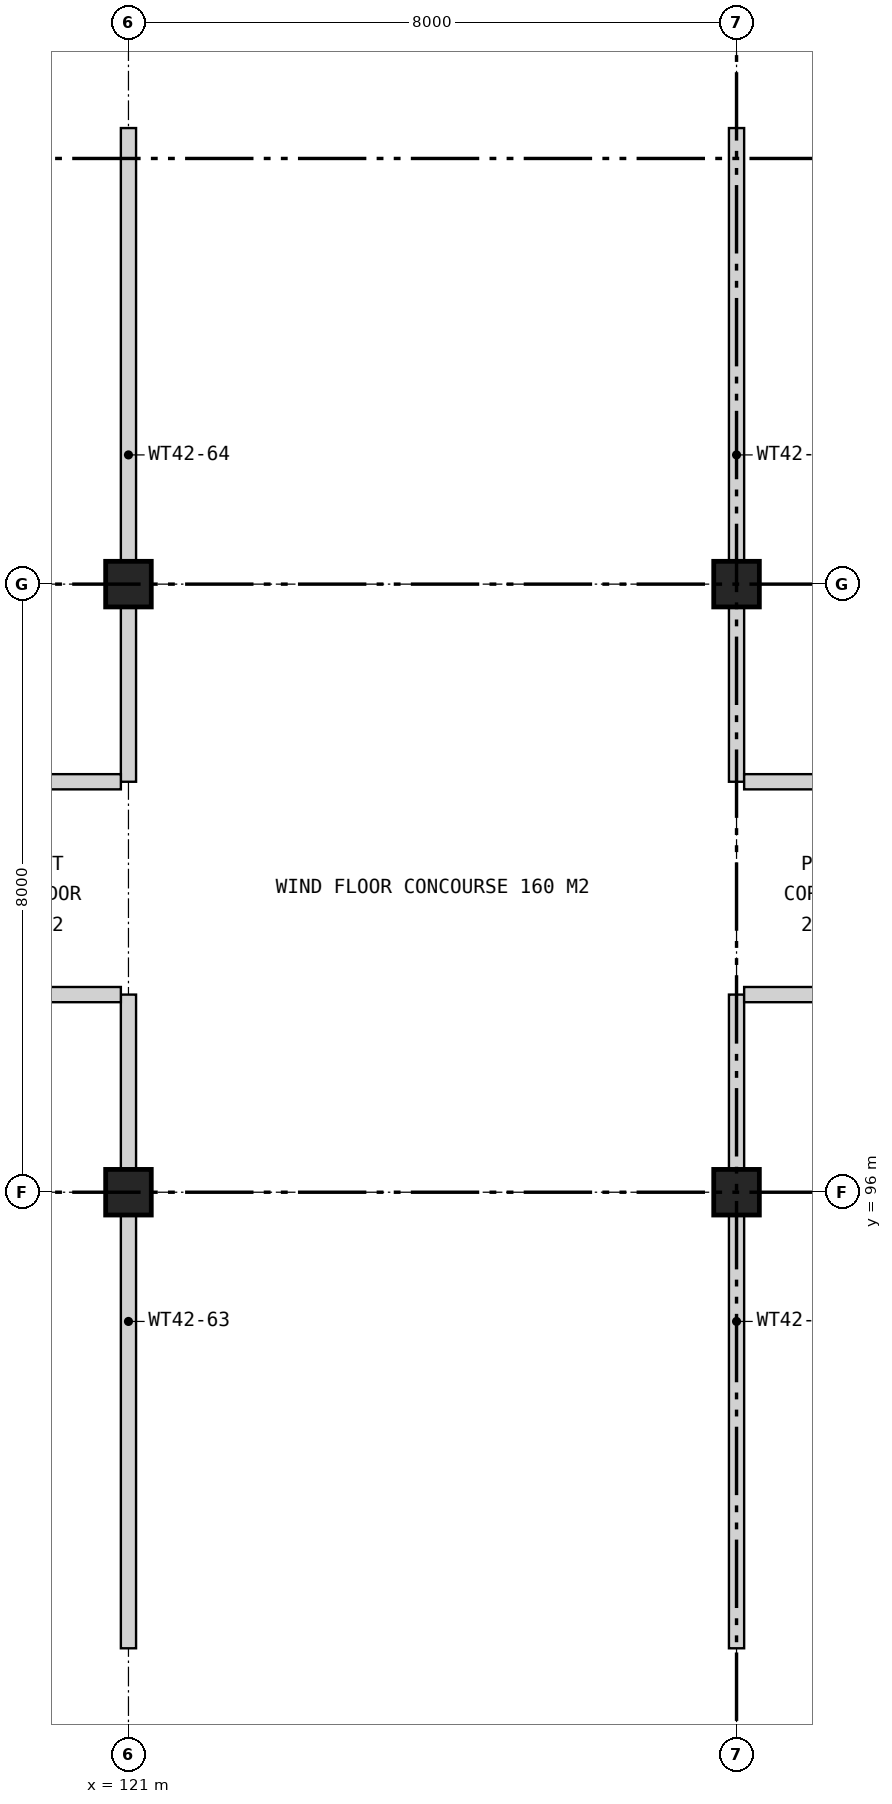
"""IFC4 building model, lengths in metres.
Left out: names, types, materials, properties, quantities, classifications, styles, units other than length and angle.
Written with IfcOpenShell. Run it as: python <this file> out.ifc"""

import sys

from ifc_helpers import new_model, si_unit, direction, frame, frame_2d, origin, origin_2d, place, context, subcontext, project, spatial, rectangle, extrude, element, save


model = new_model("IFC4")
c1 = context("Model", 3, precision=1e-05, world=origin(), true_north=direction((0.0, 1.0)))
c2 = subcontext(c1, "Body", "Model", "MODEL_VIEW")
j1 = project(units=[si_unit("LENGTHUNIT", "METRE"), si_unit("PLANEANGLEUNIT", "RADIAN")], contexts=[c1])
p1 = place(None, origin())
s1 = spatial("IfcSite", under=j1, at=p1, CompositionType="ELEMENT")
p2 = place(p1, origin())
s2 = spatial("IfcBuilding", under=s1, at=p2, CompositionType="ELEMENT")
p3 = place(p2, frame((0.0, 0.0, 303.9)))
s3 = spatial("IfcBuildingStorey", under=s2, at=p3, CompositionType="ELEMENT", Elevation=303.9)
for number, where, z_axis, x_axis in (
    (1, (121.0, 96.0, 0.0), (0.0, 0.0, 1.0), (1.0, 0.0, 0.0)),
    (2, (121.0, 104.0, 0.0), (0.0, 0.0, 1.0), (1.0, 0.0, 0.0)),
    (3, (129.0, 96.0, 0.0), (0.0, 0.0, 1.0), (1.0, 0.0, 0.0)),
    (4, (129.0, 104.0, 0.0), (0.0, 0.0, 1.0), (1.0, 0.0, 0.0)),
):
    element("IfcColumn", number, at=place(p3, frame(where, z_axis=z_axis, x_axis=x_axis)), inside=s3, PredefinedType="COLUMN", context=c2, shape_type="SweptSolid", body=[
        extrude(rectangle(XDim=0.6, YDim=0.6, at=origin_2d()), origin(), (0.0, 0.0, 1.0), 7.4),
    ])
for number, where, z_axis, x_axis in (
    (5, (121.0, 90.0, 0.0), (0.0, 0.0, 1.0), (0.0, 1.0, 0.0)),
    (6, (121.0, 101.4, 0.0), (0.0, 0.0, 1.0), (0.0, 1.0, 0.0)),
    (7, (129.0, 90.0, 0.0), (0.0, 0.0, 1.0), (0.0, 1.0, 0.0)),
    (8, (129.0, 101.4, 0.0), (0.0, 0.0, 1.0), (0.0, 1.0, 0.0)),
):
    element("IfcWall", number, at=place(p3, frame(where, z_axis=z_axis, x_axis=x_axis)), inside=s3, PredefinedType="SOLIDWALL", context=c2, shape_type="SweptSolid", body=[
        extrude(rectangle(XDim=8.6, YDim=0.2, at=frame_2d((4.3, 0.0))), origin(), (0.0, 0.0, 1.0), 6.643),
    ])
p4 = place(p3, frame((113.0, 98.6, 0.0), z_axis=(0.0, 0.0, 1.0), x_axis=(1.0, 0.0, 0.0)))
e9 = element("IfcWall", 9, at=p4, inside=s3, PredefinedType="SOLIDWALL", context=c2, shape_type="SweptSolid", body=[
    extrude(rectangle(XDim=7.9, YDim=0.2, at=frame_2d((3.95, 0.0))), origin(), (0.0, 0.0, 1.0), 6.643),
])
p5 = place(p4, frame((4.25, 0.0, 0.0)))
e10 = element("IfcOpeningElement", 10, at=p5, cuts=e9, PredefinedType="OPENING", context=c2, shape_type="SweptSolid", body=[
    extrude(rectangle(XDim=1.0, YDim=2.1, at=frame_2d((0.5, 1.05))), frame((0.0, 0.11, 0.0), z_axis=(0.0, -1.0, 0.0), x_axis=(1.0, 0.0, 0.0)), (0.0, 0.0, 1.0), 0.22),
])
p6 = place(p3, frame((129.1, 98.6, 0.0), z_axis=(0.0, 0.0, 1.0), x_axis=(1.0, 0.0, 0.0)))
e11 = element("IfcWall", 11, at=p6, inside=s3, PredefinedType="SOLIDWALL", context=c2, shape_type="SweptSolid", body=[
    extrude(rectangle(XDim=7.9, YDim=0.2, at=frame_2d((3.95, 0.0))), origin(), (0.0, 0.0, 1.0), 6.643),
])
p7 = place(p6, frame((2.65, 0.0, 0.0)))
e12 = element("IfcOpeningElement", 12, at=p7, cuts=e11, PredefinedType="OPENING", context=c2, shape_type="SweptSolid", body=[
    extrude(rectangle(XDim=1.0, YDim=2.1, at=frame_2d((0.5, 1.05))), frame((0.0, 0.11, 0.0), z_axis=(0.0, -1.0, 0.0), x_axis=(1.0, 0.0, 0.0)), (0.0, 0.0, 1.0), 0.22),
])
p8 = place(p3, frame((113.0, 101.4, 0.0), z_axis=(0.0, 0.0, 1.0), x_axis=(1.0, 0.0, 0.0)))
e13 = element("IfcWall", 13, at=p8, inside=s3, PredefinedType="SOLIDWALL", context=c2, shape_type="SweptSolid", body=[
    extrude(rectangle(XDim=7.9, YDim=0.2, at=frame_2d((3.95, 0.0))), origin(), (0.0, 0.0, 1.0), 6.643),
])
p9 = place(p8, frame((4.25, 0.0, 0.0)))
e14 = element("IfcOpeningElement", 14, at=p9, cuts=e13, PredefinedType="OPENING", context=c2, shape_type="SweptSolid", body=[
    extrude(rectangle(XDim=1.0, YDim=2.1, at=frame_2d((0.5, 1.05))), frame((0.0, 0.11, 0.0), z_axis=(0.0, -1.0, 0.0), x_axis=(1.0, 0.0, 0.0)), (0.0, 0.0, 1.0), 0.22),
])
p10 = place(p3, frame((129.1, 101.4, 0.0), z_axis=(0.0, 0.0, 1.0), x_axis=(1.0, 0.0, 0.0)))
e15 = element("IfcWall", 15, at=p10, inside=s3, PredefinedType="SOLIDWALL", context=c2, shape_type="SweptSolid", body=[
    extrude(rectangle(XDim=7.9, YDim=0.2, at=frame_2d((3.95, 0.0))), origin(), (0.0, 0.0, 1.0), 6.643),
])
p11 = place(p10, frame((2.65, 0.0, 0.0)))
e16 = element("IfcOpeningElement", 16, at=p11, cuts=e15, PredefinedType="OPENING", context=c2, shape_type="SweptSolid", body=[
    extrude(rectangle(XDim=1.0, YDim=2.1, at=frame_2d((0.5, 1.05))), frame((0.0, 0.11, 0.0), z_axis=(0.0, -1.0, 0.0), x_axis=(1.0, 0.0, 0.0)), (0.0, 0.0, 1.0), 0.22),
])
save(model, sys.argv[1])
